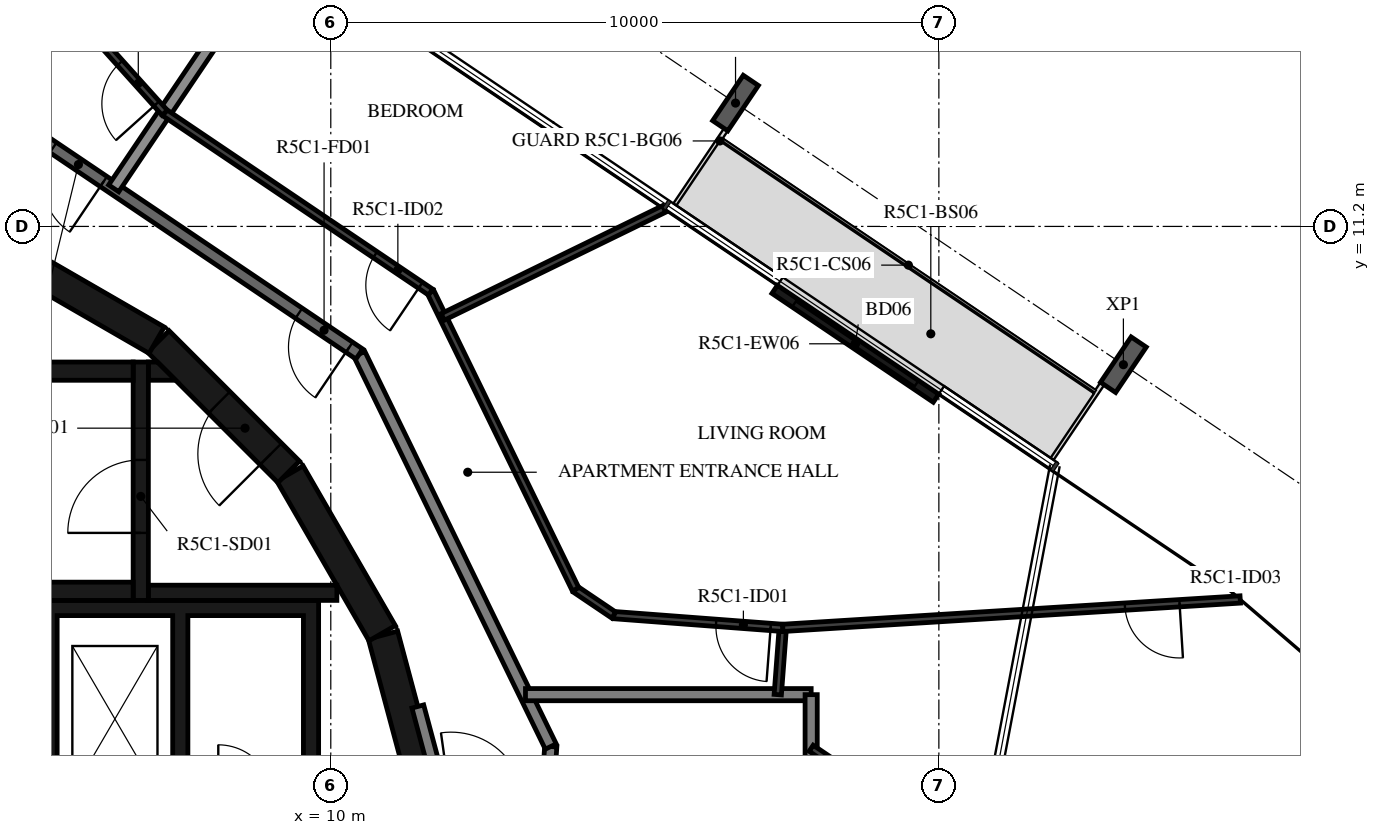
"""IFC4 building model, lengths in metres.
Left out: names, types, materials, properties, quantities, classifications, styles, units other than length and angle.
Written with IfcOpenShell. Run it as: python <this file> out.ifc"""

import sys

from ifc_helpers import new_model, si_unit, direction, frame, frame_2d, origin, origin_2d, place, context, subcontext, project, spatial, polyline, rectangle, i_section, outline, extrude, element, fill, save


model = new_model("IFC4")
c1 = context("Model", 3, precision=1e-05, world=origin(), true_north=direction((0.0, 1.0)))
c2 = subcontext(c1, "Body", "Model", "MODEL_VIEW")
j1 = project(units=[si_unit("LENGTHUNIT", "METRE"), si_unit("PLANEANGLEUNIT", "RADIAN")], contexts=[c1])
p1 = place(None, origin())
s1 = spatial("IfcSite", under=j1, at=p1, CompositionType="ELEMENT")
p2 = place(p1, origin())
s2 = spatial("IfcBuilding", under=s1, at=p2, CompositionType="ELEMENT")
p3 = place(p2, frame((0.0, 0.0, 212.9)))
s3 = spatial("IfcBuildingStorey", under=s2, at=p3, CompositionType="ELEMENT", Elevation=212.9)
for number, where, z_axis, x_axis in (
    (1, (23.035, 8.926, -0.38), (0.0, 0.0, 1.0), (0.829, -0.559, 0.0)),
    (2, (16.656, 13.228, -0.38), (0.0, 0.0, 1.0), (0.829, -0.559, 0.0)),
):
    element("IfcColumn", number, at=place(p3, frame(where, z_axis=z_axis, x_axis=x_axis)), inside=s3, PredefinedType="COLUMN", context=c2, shape_type="SweptSolid", body=[
        extrude(i_section(OverallWidth=0.3, OverallDepth=0.9, WebThickness=0.019, FlangeThickness=0.035, FilletRadius=0.03, at=origin_2d()), origin(), (0.0, 0.0, 1.0), 3.5),
    ])
p4 = place(p3, frame((19.953, 8.375, 0.0), z_axis=(0.0, 0.0, 1.0), x_axis=(-0.829068838882, 0.55914654644, 0.0)))
e3 = element("IfcWall", 3, at=p4, inside=s3, PredefinedType="STANDARD", context=c2, shape_type="SweptSolid", body=[
    extrude(rectangle(XDim=3.2, YDim=0.16, at=frame_2d((1.6, 0.0))), origin(), (0.0, 0.0, 1.0), 3.12),
])
p5 = place(p4, frame((0.4, 0.0, 0.0)))
e4 = element("IfcOpeningElement", 4, at=p5, cuts=e3, PredefinedType="OPENING", context=c2, shape_type="SweptSolid", body=[
    extrude(rectangle(XDim=2.4, YDim=2.4, at=frame_2d((1.2, 1.2))), frame((0.0, 0.09, 0.0), z_axis=(0.0, -1.0, 0.0), x_axis=(1.0, 0.0, 0.0)), (0.0, 0.0, 1.0), 0.18),
])
for number, where, z_axis, x_axis in (
    (5, (11.643, 1.55, 0.0), (0.0, 0.0, 1.0), (-0.259, 0.966, 0.0)),
    (6, (10.845, 4.51, 0.0), (0.0, 0.0, 1.0), (-0.5, 0.866, 0.0)),
):
    element("IfcWall", number, at=place(p3, frame(where, z_axis=z_axis, x_axis=x_axis)), inside=s3, PredefinedType="SHEAR", context=c2, shape_type="SweptSolid", body=[
        extrude(rectangle(XDim=3.033, YDim=0.5, at=frame_2d((1.516, 0.0))), origin(), (0.0, 0.0, 1.0), 3.12),
    ])
p6 = place(p3, frame((9.308, 7.164, 0.0), z_axis=(0.0, 0.0, 1.0), x_axis=(-0.707106781187, 0.707106781187, 0.0)))
e7 = element("IfcWall", 7, at=p6, inside=s3, PredefinedType="SHEAR", context=c2, shape_type="SweptSolid", body=[
    extrude(rectangle(XDim=3.032, YDim=0.5, at=frame_2d((1.516, 0.0))), origin(), (0.0, 0.0, 1.0), 3.12),
])
p7 = place(p6, frame((0.416, 0.0, 0.0)))
e8 = element("IfcOpeningElement", 8, at=p7, cuts=e7, PredefinedType="OPENING", context=c2, shape_type="SweptSolid", body=[
    extrude(rectangle(XDim=1.2, YDim=2.1, at=frame_2d((0.6, 1.05))), frame((0.0, 0.26, 0.0), z_axis=(0.0, -1.0, 0.0), x_axis=(1.0, 0.0, 0.0)), (0.0, 0.0, 1.0), 0.52),
])
p8 = place(p3, frame((7.137, 9.329, 0.0), z_axis=(0.0, 0.0, 1.0), x_axis=(-0.865975092491, 0.500087131594, 0.0)))
e9 = element("IfcWall", 9, at=p8, inside=s3, PredefinedType="SHEAR", context=c2, shape_type="SweptSolid", body=[
    extrude(rectangle(XDim=3.033, YDim=0.5, at=frame_2d((1.516, 0.0))), origin(), (0.0, 0.0, 1.0), 3.12),
])
for number, where, z_axis, x_axis in (
    (10, (0.0, 5.2, 0.0), (0.0, 0.0, 1.0), (1.0, 0.0, 0.0)),
    (11, (0.0, 8.82, 0.0), (0.0, 0.0, 1.0), (1.0, 0.0, 0.0)),
):
    element("IfcWall", number, at=place(p3, frame(where, z_axis=z_axis, x_axis=x_axis)), inside=s3, PredefinedType="SHEAR", context=c2, shape_type="SweptSolid", body=[
        extrude(rectangle(XDim=6.75, YDim=0.3, at=frame_2d((3.375, 0.0))), origin(), (0.0, 0.0, 1.0), 3.12),
    ])
p9 = place(p3, frame((6.875, 5.05, 0.0), z_axis=(0.0, 0.0, 1.0), x_axis=(0.0, 1.0, 0.0)))
e12 = element("IfcWall", 12, at=p9, inside=s3, PredefinedType="SHEAR", context=c2, shape_type="SweptSolid", body=[
    extrude(rectangle(XDim=3.92, YDim=0.25, at=frame_2d((1.96, 0.0))), origin(), (0.0, 0.0, 1.0), 3.12),
])
p10 = place(p9, frame((1.11, 0.0, 0.0)))
e13 = element("IfcOpeningElement", 13, at=p10, cuts=e12, PredefinedType="OPENING", context=c2, shape_type="SweptSolid", body=[
    extrude(rectangle(XDim=1.2, YDim=2.1, at=frame_2d((0.6, 1.05))), frame((0.0, 0.135, 0.0), z_axis=(0.0, -1.0, 0.0), x_axis=(1.0, 0.0, 0.0)), (0.0, 0.0, 1.0), 0.27),
])
p11 = place(p3, frame((7.0, 5.175, 0.0), z_axis=(0.0, 0.0, 1.0), x_axis=(1.0, 0.0, 0.0)))
e14 = element("IfcWall", 14, at=p11, inside=s3, PredefinedType="SHEAR", context=c2, shape_type="SweptSolid", body=[
    extrude(rectangle(XDim=3.1, YDim=0.25, at=frame_2d((1.55, 0.0))), origin(), (0.0, 0.0, 1.0), 3.12),
])
p12 = place(p3, origin())
e15 = element("IfcWall", 15, at=p12, inside=s3, PredefinedType="SHEAR", context=c2, shape_type="SweptSolid", body=[
    extrude(outline(polyline([(7.448, 8.67), (7.0, 8.67), (7.0, 8.97), (7.148, 8.97), (7.448, 8.67)])), origin(), (0.0, 0.0, 1.0), 3.12),
])
p13 = place(p3, origin())
e16 = element("IfcWall", 16, at=p13, inside=s3, PredefinedType="SHEAR", context=c2, shape_type="SweptSolid", body=[
    extrude(outline(polyline([(-9.55, 4.8), (-5.5, 4.8), (-5.5, 1.9), (-5.25, 1.9), (-5.25, 4.8), (-1.2, 4.8), (-1.2, 1.9), (-0.95, 1.9), (-0.95, 4.8), (0.95, 4.8), (0.95, 1.9), (1.2, 1.9), (1.2, 4.8), (3.1, 4.8), (3.1, 1.9), (3.35, 1.9), (3.35, 4.8), (5.25, 4.8), (5.25, 1.9), (5.5, 1.9), (5.5, 4.8), (7.4, 4.8), (7.4, 1.9), (7.65, 1.9), (7.65, 4.8), (9.55, 4.8), (9.55, 1.9), (9.8, 1.9), (9.8, 4.8), (9.8, 5.05), (-9.8, 5.05), (-9.8, 4.8), (-9.8, 1.9), (-9.55, 1.9), (-9.55, 4.8)])), origin(), (0.0, 0.0, 1.0), 3.12),
])
p14 = place(p3, frame((11.87, 1.668, 0.0), z_axis=(0.0, 0.0, 1.0), x_axis=(-0.258836880648, 0.965921047093, 0.0)))
e17 = element("IfcWall", 17, at=p14, inside=s3, PredefinedType="STANDARD", context=c2, shape_type="SweptSolid", body=[
    extrude(rectangle(XDim=1.695, YDim=0.2, at=frame_2d((0.848, 0.0))), origin(), (0.0, 0.0, 1.0), 3.12),
])
p15 = place(p3, frame((13.566, 1.906, 0.0), z_axis=(0.0, 0.0, 1.0), x_axis=(0.07005495793, 0.997543133338, 0.0)))
e18 = element("IfcWall", 18, at=p15, inside=s3, PredefinedType="STANDARD", context=c2, shape_type="SweptSolid", body=[
    extrude(rectangle(XDim=0.742, YDim=0.2, at=frame_2d((0.371, 0.0))), origin(), (0.0, 0.0, 1.0), 3.12),
])
p16 = place(p3, frame((13.618, 2.647, 0.0), z_axis=(0.0, 0.0, 1.0), x_axis=(-0.438366026218, 0.898796543751, 0.0)))
e19 = element("IfcWall", 19, at=p16, inside=s3, PredefinedType="STANDARD", context=c2, shape_type="SweptSolid", body=[
    extrude(rectangle(XDim=7.181, YDim=0.2, at=frame_2d((3.591, 0.0))), origin(), (0.0, 0.0, 1.0), 3.12),
])
p17 = place(p3, frame((10.47, 9.101, 0.0), z_axis=(0.0, 0.0, 1.0), x_axis=(-0.829035841718, 0.559195469534, 0.0)))
e20 = element("IfcWall", 20, at=p17, inside=s3, PredefinedType="STANDARD", context=c2, shape_type="SweptSolid", body=[
    extrude(rectangle(XDim=7.181, YDim=0.2, at=frame_2d((3.591, 0.0))), origin(), (0.0, 0.0, 1.0), 3.12),
])
p18 = place(p17, frame((0.2, 0.0, 0.0)))
e21 = element("IfcOpeningElement", 21, at=p18, cuts=e20, PredefinedType="OPENING", context=c2, shape_type="SweptSolid", body=[
    extrude(rectangle(XDim=1.0, YDim=2.1, at=frame_2d((0.5, 1.05))), frame((0.0, 0.11, 0.0), z_axis=(0.0, -1.0, 0.0), x_axis=(1.0, 0.0, 0.0)), (0.0, 0.0, 1.0), 0.22),
])
p19 = place(p17, frame((5.073, 0.0, 0.0)))
e22 = element("IfcOpeningElement", 22, at=p19, cuts=e20, PredefinedType="OPENING", context=c2, shape_type="SweptSolid", body=[
    extrude(rectangle(XDim=1.0, YDim=2.1, at=frame_2d((0.5, 1.05))), frame((0.0, 0.11, 0.0), z_axis=(0.0, -1.0, 0.0), x_axis=(1.0, 0.0, 0.0)), (0.0, 0.0, 1.0), 0.22),
])
p20 = place(p3, frame((17.9, 3.5, 0.0), z_axis=(0.0, 0.0, 1.0), x_axis=(-1.0, 0.0, 0.0)))
e23 = element("IfcWall", 23, at=p20, inside=s3, PredefinedType="STANDARD", context=c2, shape_type="SweptSolid", body=[
    extrude(rectangle(XDim=4.698, YDim=0.2, at=frame_2d((2.349, 0.0))), origin(), (0.0, 0.0, 1.0), 3.12),
])
p21 = place(p3, frame((17.9, -3.5, 0.0), z_axis=(0.0, 0.0, 1.0), x_axis=(0.0, 1.0, 0.0)))
e24 = element("IfcWall", 24, at=p21, inside=s3, PredefinedType="STANDARD", context=c2, shape_type="SweptSolid", body=[
    extrude(rectangle(XDim=7.0, YDim=0.2, at=frame_2d((3.5, 0.0))), origin(), (0.0, 0.0, 1.0), 3.12),
])
p22 = place(p3, frame((9.104, 15.79, 0.0), z_axis=(0.0, 0.0, 1.0), x_axis=(-0.559193912135, -0.829036892201, 0.0)))
e25 = element("IfcWall", 25, at=p22, inside=s3, PredefinedType="STANDARD", context=c2, shape_type="SweptSolid", body=[
    extrude(rectangle(XDim=4.781, YDim=0.2, at=frame_2d((2.39, 0.0))), origin(), (0.0, 0.0, 1.0), 2.73),
])
p23 = place(p3, frame((17.351, 3.5, 0.0), z_axis=(0.0, 0.0, 1.0), x_axis=(0.075374124137, 0.997155324616, 0.0)))
e26 = element("IfcWall", 26, at=p23, inside=s3, PredefinedType="PARTITIONING", context=c2, shape_type="SweptSolid", body=[
    extrude(rectangle(XDim=1.101, YDim=0.12, at=frame_2d((0.551, 0.0))), origin(), (0.0, 0.0, 1.0), 3.12),
])
p24 = place(p3, frame((17.434, 4.598, 0.0), z_axis=(0.0, 0.0, 1.0), x_axis=(-0.997152077354, 0.075417071205, 0.0)))
e27 = element("IfcWall", 27, at=p24, inside=s3, PredefinedType="PARTITIONING", context=c2, shape_type="SweptSolid", body=[
    extrude(rectangle(XDim=2.787, YDim=0.12, at=frame_2d((1.394, 0.0))), origin(), (0.0, 0.0, 1.0), 3.12),
])
p25 = place(p24, frame((0.2, 0.0, 0.0)))
e28 = element("IfcOpeningElement", 28, at=p25, cuts=e27, PredefinedType="OPENING", context=c2, shape_type="SweptSolid", body=[
    extrude(rectangle(XDim=0.9, YDim=2.1, at=frame_2d((0.45, 1.05))), frame((0.0, 0.07, 0.0), z_axis=(0.0, -1.0, 0.0), x_axis=(1.0, 0.0, 0.0)), (0.0, 0.0, 1.0), 0.14),
])
p26 = place(p3, frame((14.654, 4.808, 0.0), z_axis=(0.0, 0.0, 1.0), x_axis=(-0.829065184024, 0.559151965604, 0.0)))
e29 = element("IfcWall", 29, at=p26, inside=s3, PredefinedType="PARTITIONING", context=c2, shape_type="SweptSolid", body=[
    extrude(rectangle(XDim=0.758, YDim=0.12, at=frame_2d((0.379, 0.0))), origin(), (0.0, 0.0, 1.0), 3.12),
])
p27 = place(p3, frame((14.026, 5.232, 0.0), z_axis=(0.0, 0.0, 1.0), x_axis=(-0.438374985284, 0.89879217413, 0.0)))
e30 = element("IfcWall", 30, at=p27, inside=s3, PredefinedType="PARTITIONING", context=c2, shape_type="SweptSolid", body=[
    extrude(rectangle(XDim=5.438, YDim=0.12, at=frame_2d((2.719, 0.0))), origin(), (0.0, 0.0, 1.0), 3.12),
])
p28 = place(p3, frame((11.642, 10.12, 0.0), z_axis=(0.0, 0.0, 1.0), x_axis=(-0.829054664054, 0.559167563446, 0.0)))
e31 = element("IfcWall", 31, at=p28, inside=s3, PredefinedType="PARTITIONING", context=c2, shape_type="SweptSolid", body=[
    extrude(rectangle(XDim=5.275, YDim=0.12, at=frame_2d((2.637, 0.0))), origin(), (0.0, 0.0, 1.0), 3.12),
])
p29 = place(p28, frame((0.2, 0.0, 0.0)))
e32 = element("IfcOpeningElement", 32, at=p29, cuts=e31, PredefinedType="OPENING", context=c2, shape_type="SweptSolid", body=[
    extrude(rectangle(XDim=0.9, YDim=2.1, at=frame_2d((0.45, 1.05))), frame((0.0, 0.07, 0.0), z_axis=(0.0, -1.0, 0.0), x_axis=(1.0, 0.0, 0.0)), (0.0, 0.0, 1.0), 0.14),
])
p30 = place(p3, frame((21.141, 0.433, 0.0), z_axis=(0.0, 0.0, 1.0), x_axis=(-0.829049908454, 0.559174614313, 0.0)))
e33 = element("IfcWall", 33, at=p30, inside=s3, PredefinedType="PARTITIONING", context=c2, shape_type="SweptSolid", body=[
    extrude(rectangle(XDim=3.909, YDim=0.12, at=frame_2d((1.955, 0.0))), origin(), (0.0, 0.0, 1.0), 3.12),
])
p31 = place(p30, frame((0.8, 0.0, 0.0)))
e34 = element("IfcOpeningElement", 34, at=p31, cuts=e33, PredefinedType="OPENING", context=c2, shape_type="SweptSolid", body=[
    extrude(rectangle(XDim=0.8, YDim=2.1, at=frame_2d((0.4, 1.05))), frame((0.0, 0.07, 0.0), z_axis=(0.0, -1.0, 0.0), x_axis=(1.0, 0.0, 0.0)), (0.0, 0.0, 1.0), 0.14),
])
p32 = place(p3, frame((24.956, 5.065, 0.0), z_axis=(0.0, 0.0, 1.0), x_axis=(-0.998076202118, -0.061999151332, 0.0)))
e35 = element("IfcWall", 35, at=p32, inside=s3, PredefinedType="PARTITIONING", context=c2, shape_type="SweptSolid", body=[
    extrude(rectangle(XDim=7.537, YDim=0.12, at=frame_2d((3.769, 0.0))), origin(), (0.0, 0.0, 1.0), 3.12),
])
p33 = place(p32, frame((1.0, 0.0, 0.0)))
e36 = element("IfcOpeningElement", 36, at=p33, cuts=e35, PredefinedType="OPENING", context=c2, shape_type="SweptSolid", body=[
    extrude(rectangle(XDim=0.9, YDim=2.1, at=frame_2d((0.45, 1.05))), frame((0.0, 0.07, 0.0), z_axis=(0.0, -1.0, 0.0), x_axis=(1.0, 0.0, 0.0)), (0.0, 0.0, 1.0), 0.14),
])
p34 = place(p3, frame((21.95, -0.382, 0.0), z_axis=(0.0, 0.0, 1.0), x_axis=(0.844596663126, 0.535403097336, 0.0)))
e37 = element("IfcWall", 37, at=p34, inside=s3, PredefinedType="PARTITIONING", context=c2, shape_type="SweptSolid", body=[
    extrude(rectangle(XDim=6.022, YDim=0.12, at=frame_2d((3.011, 0.0))), origin(), (0.0, 0.0, 1.0), 2.73),
])
p35 = place(p34, frame((0.6, 0.0, 0.0)))
e38 = element("IfcOpeningElement", 38, at=p35, cuts=e37, PredefinedType="OPENING", context=c2, shape_type="SweptSolid", body=[
    extrude(rectangle(XDim=0.9, YDim=2.1, at=frame_2d((0.45, 1.05))), frame((0.0, 0.07, 0.0), z_axis=(0.0, -1.0, 0.0), x_axis=(1.0, 0.0, 0.0)), (0.0, 0.0, 1.0), 0.14),
])
p36 = place(p3, frame((15.482, 11.487, 0.0), z_axis=(0.0, 0.0, 1.0), x_axis=(-0.898807251285, -0.438344071521, 0.0)))
e39 = element("IfcWall", 39, at=p36, inside=s3, PredefinedType="PARTITIONING", context=c2, shape_type="SweptSolid", body=[
    extrude(rectangle(XDim=4.051, YDim=0.12, at=frame_2d((2.025, 0.0))), origin(), (0.0, 0.0, 1.0), 3.12),
])
p37 = place(p3, frame((7.269, 13.07, 0.0), z_axis=(0.0, 0.0, 1.0), x_axis=(-0.668495993587, 0.743715743116, 0.0)))
e40 = element("IfcWall", 40, at=p37, inside=s3, PredefinedType="PARTITIONING", context=c2, shape_type="SweptSolid", body=[
    extrude(rectangle(XDim=3.281, YDim=0.12, at=frame_2d((1.641, 0.0))), origin(), (0.0, 0.0, 1.0), 3.12),
])
p38 = place(p37, frame((0.2, 0.0, 0.0)))
e41 = element("IfcOpeningElement", 41, at=p38, cuts=e40, PredefinedType="OPENING", context=c2, shape_type="SweptSolid", body=[
    extrude(rectangle(XDim=0.9, YDim=2.1, at=frame_2d((0.45, 1.05))), frame((0.0, 0.07, 0.0), z_axis=(0.0, -1.0, 0.0), x_axis=(1.0, 0.0, 0.0)), (0.0, 0.0, 1.0), 0.14),
])
p39 = place(p5, origin())
e42 = element("IfcDoor", 42, at=p39, inside=s3, OperationType="DOUBLE_DOOR_SLIDING", PredefinedType="DOOR", context=c2, shape_type="SweptSolid", body=[
    extrude(rectangle(XDim=2.4, YDim=2.4, at=frame_2d((1.2, 1.2))), frame((0.0, 0.025, 0.0), z_axis=(0.0, -1.0, 0.0), x_axis=(1.0, 0.0, 0.0)), (0.0, 0.0, 1.0), 0.05),
])
fill(e4, e42)
p40 = place(p10, origin())
e43 = element("IfcDoor", 43, at=p40, inside=s3, OperationType="SINGLE_SWING_LEFT", PredefinedType="DOOR", context=c2, shape_type="SweptSolid", body=[
    extrude(rectangle(XDim=1.2, YDim=2.1, at=frame_2d((0.6, 1.05))), frame((0.0, 0.025, 0.0), z_axis=(0.0, -1.0, 0.0), x_axis=(1.0, 0.0, 0.0)), (0.0, 0.0, 1.0), 0.05),
])
fill(e13, e43)
p41 = place(p7, origin())
e44 = element("IfcDoor", 44, at=p41, inside=s3, OperationType="SINGLE_SWING_RIGHT", PredefinedType="DOOR", context=c2, shape_type="SweptSolid", body=[
    extrude(rectangle(XDim=1.2, YDim=2.1, at=frame_2d((0.6, 1.05))), frame((0.0, 0.025, 0.0), z_axis=(0.0, -1.0, 0.0), x_axis=(1.0, 0.0, 0.0)), (0.0, 0.0, 1.0), 0.05),
])
fill(e8, e44)
p42 = place(p18, origin())
e45 = element("IfcDoor", 45, at=p42, inside=s3, OperationType="SINGLE_SWING_LEFT", PredefinedType="DOOR", context=c2, shape_type="SweptSolid", body=[
    extrude(rectangle(XDim=1.0, YDim=2.1, at=frame_2d((0.5, 1.05))), frame((0.0, 0.025, 0.0), z_axis=(0.0, -1.0, 0.0), x_axis=(1.0, 0.0, 0.0)), (0.0, 0.0, 1.0), 0.05),
])
fill(e21, e45)
p43 = place(p25, origin())
e46 = element("IfcDoor", 46, at=p43, inside=s3, OperationType="SINGLE_SWING_LEFT", PredefinedType="DOOR", context=c2, shape_type="SweptSolid", body=[
    extrude(rectangle(XDim=0.9, YDim=2.1, at=frame_2d((0.45, 1.05))), frame((0.0, 0.025, 0.0), z_axis=(0.0, -1.0, 0.0), x_axis=(1.0, 0.0, 0.0)), (0.0, 0.0, 1.0), 0.05),
])
fill(e28, e46)
p44 = place(p29, origin())
e47 = element("IfcDoor", 47, at=p44, inside=s3, OperationType="SINGLE_SWING_LEFT", PredefinedType="DOOR", context=c2, shape_type="SweptSolid", body=[
    extrude(rectangle(XDim=0.9, YDim=2.1, at=frame_2d((0.45, 1.05))), frame((0.0, 0.025, 0.0), z_axis=(0.0, -1.0, 0.0), x_axis=(1.0, 0.0, 0.0)), (0.0, 0.0, 1.0), 0.05),
])
fill(e32, e47)
p45 = place(p33, origin())
e48 = element("IfcDoor", 48, at=p45, inside=s3, OperationType="SINGLE_SWING_LEFT", PredefinedType="DOOR", context=c2, shape_type="SweptSolid", body=[
    extrude(rectangle(XDim=0.9, YDim=2.1, at=frame_2d((0.45, 1.05))), frame((0.0, 0.025, 0.0), z_axis=(0.0, -1.0, 0.0), x_axis=(1.0, 0.0, 0.0)), (0.0, 0.0, 1.0), 0.05),
])
fill(e36, e48)
p46 = place(p19, origin())
e49 = element("IfcDoor", 49, at=p46, inside=s3, OperationType="SINGLE_SWING_RIGHT", PredefinedType="DOOR", context=c2, shape_type="SweptSolid", body=[
    extrude(rectangle(XDim=1.0, YDim=2.1, at=frame_2d((0.5, 1.05))), frame((0.0, 0.025, 0.0), z_axis=(0.0, -1.0, 0.0), x_axis=(1.0, 0.0, 0.0)), (0.0, 0.0, 1.0), 0.05),
])
fill(e22, e49)
p47 = place(p38, origin())
e50 = element("IfcDoor", 50, at=p47, inside=s3, OperationType="SINGLE_SWING_RIGHT", PredefinedType="DOOR", context=c2, shape_type="SweptSolid", body=[
    extrude(rectangle(XDim=0.9, YDim=2.1, at=frame_2d((0.45, 1.05))), frame((0.0, 0.025, 0.0), z_axis=(0.0, -1.0, 0.0), x_axis=(1.0, 0.0, 0.0)), (0.0, 0.0, 1.0), 0.05),
])
fill(e41, e50)
save(model, sys.argv[1])
